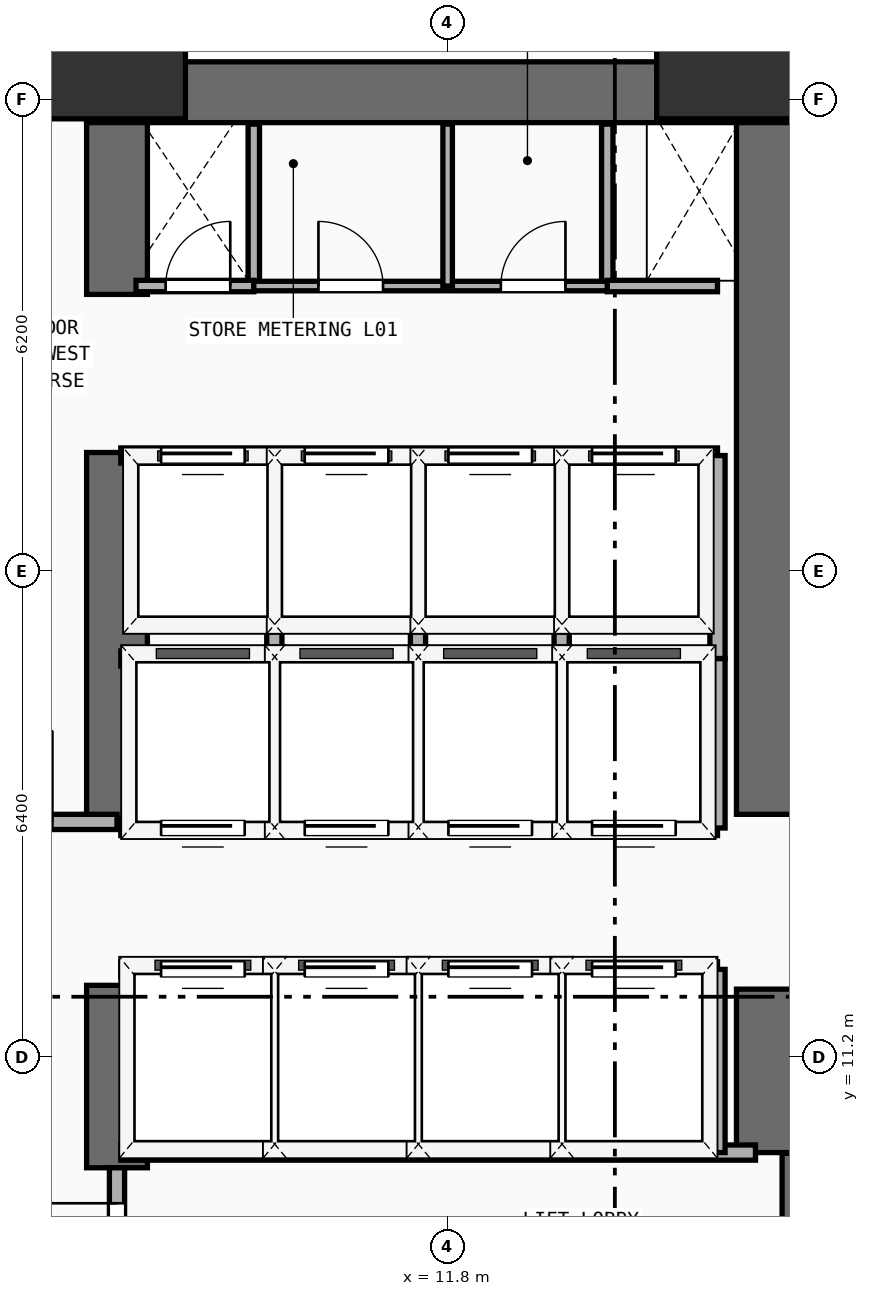
"""IFC4 building model, lengths in metres.
Left out: names, types, materials, properties, quantities, classifications, styles, units other than length and angle.
Written with IfcOpenShell. Run it as: python <this file> out.ifc"""

import sys

from ifc_helpers import new_model, si_unit, direction, frame, frame_2d, origin, origin_2d, place, context, subcontext, project, spatial, rectangle, extrude, element, fill, save


model = new_model("IFC4")
c1 = context("Model", 3, precision=1e-05, world=origin(), true_north=direction((0.0, 1.0)))
c2 = subcontext(c1, "Body", "Model", "MODEL_VIEW")
j1 = project(units=[si_unit("LENGTHUNIT", "METRE"), si_unit("PLANEANGLEUNIT", "RADIAN")], contexts=[c1])
p1 = place(None, origin())
s1 = spatial("IfcSite", under=j1, at=p1, CompositionType="ELEMENT")
p2 = place(p1, origin())
s2 = spatial("IfcBuilding", under=s1, at=p2, CompositionType="ELEMENT")
p3 = place(p2, origin())
s3 = spatial("IfcBuildingStorey", under=s2, at=p3, CompositionType="ELEMENT", Elevation=0.0)
p4 = place(p3, frame((7.05, 23.9, 0.0), z_axis=(0.0, 0.0, 1.0), x_axis=(1.0, 0.0, 0.0)))
e1 = element("IfcWall", 1, at=p4, inside=s3, PredefinedType="SHEAR", context=c2, shape_type="SweptSolid", body=[
    extrude(rectangle(XDim=14.15, YDim=0.8, at=frame_2d((7.075, 0.0))), origin(), (0.0, 0.0, 1.0), 5.26),
])
p5 = place(p3, frame((7.45, 9.75, 0.0), z_axis=(0.0, 0.0, 1.0), x_axis=(0.0, 1.0, 0.0)))
e2 = element("IfcWall", 2, at=p5, inside=s3, PredefinedType="SHEAR", context=c2, shape_type="SweptSolid", body=[
    extrude(rectangle(XDim=2.4, YDim=0.8, at=frame_2d((1.2, 0.0))), origin(), (0.0, 0.0, 1.0), 5.26),
])
p6 = place(p3, frame((7.45, 14.35, 0.0), z_axis=(0.0, 0.0, 1.0), x_axis=(0.0, 1.0, 0.0)))
e3 = element("IfcWall", 3, at=p6, inside=s3, PredefinedType="SHEAR", context=c2, shape_type="SweptSolid", body=[
    extrude(rectangle(XDim=4.81, YDim=0.8, at=frame_2d((2.405, 0.0))), origin(), (0.0, 0.0, 1.0), 5.26),
])
p7 = place(p3, frame((7.45, 21.24, 0.0), z_axis=(0.0, 0.0, 1.0), x_axis=(0.0, 1.0, 0.0)))
e4 = element("IfcWall", 4, at=p7, inside=s3, PredefinedType="SHEAR", context=c2, shape_type="SweptSolid", body=[
    extrude(rectangle(XDim=2.26, YDim=0.8, at=frame_2d((1.13, 0.0))), origin(), (0.0, 0.0, 1.0), 5.26),
])
p8 = place(p3, frame((16.0, 9.95, 0.0), z_axis=(0.0, 0.0, 1.0), x_axis=(0.0, 1.0, 0.0)))
e5 = element("IfcWall", 5, at=p8, inside=s3, PredefinedType="SHEAR", context=c2, shape_type="SweptSolid", body=[
    extrude(rectangle(XDim=2.15, YDim=0.8, at=frame_2d((1.075, 0.0))), origin(), (0.0, 0.0, 1.0), 5.26),
])
p9 = place(p3, frame((16.0, 14.4, 0.0), z_axis=(0.0, 0.0, 1.0), x_axis=(0.0, 1.0, 0.0)))
e6 = element("IfcWall", 6, at=p9, inside=s3, PredefinedType="SHEAR", context=c2, shape_type="SweptSolid", body=[
    extrude(rectangle(XDim=9.1, YDim=0.8, at=frame_2d((4.55, 0.0))), origin(), (0.0, 0.0, 1.0), 5.26),
])
for number, where, z_axis, x_axis in (
    (7, (7.45, 24.45, 0.0), (0.0, 0.0, 1.0), (1.0, 0.0, 0.0)),
    (8, (15.45, 24.45, 0.0), (0.0, 0.0, 1.0), (1.0, 0.0, 0.0)),
):
    element("IfcColumn", number, at=place(p3, frame(where, z_axis=z_axis, x_axis=x_axis)), inside=s3, PredefinedType="COLUMN", context=c2, shape_type="SweptSolid", body=[
        extrude(rectangle(XDim=1.8, YDim=1.8, at=origin_2d()), origin(), (0.0, 0.0, 1.0), 5.26),
    ])
p10 = place(p3, frame((16.3, 7.36, 0.0), z_axis=(0.0, 0.0, 1.0), x_axis=(0.0, 1.0, 0.0)))
e9 = element("IfcWall", 9, at=p10, inside=s3, PredefinedType="SHEAR", context=c2, shape_type="SweptSolid", body=[
    extrude(rectangle(XDim=2.58, YDim=0.2, at=frame_2d((1.29, 0.0))), origin(), (0.0, 0.0, 1.0), 5.26),
])
p11 = place(p3, frame((7.5, 9.95, 0.0), z_axis=(0.0, 0.0, 1.0), x_axis=(1.0, 0.0, 0.0)))
e10 = element("IfcWall", 10, at=p11, inside=s3, PredefinedType="PARTITIONING", context=c2, shape_type="SweptSolid", body=[
    extrude(rectangle(XDim=8.35, YDim=0.2, at=frame_2d((4.175, 0.0))), origin(), (0.0, 0.0, 1.0), 5.26),
])
p12 = place(p3, frame((7.45, 7.45, 0.0), z_axis=(0.0, 0.0, 1.0), x_axis=(0.0, 1.0, 0.0)))
e11 = element("IfcWall", 11, at=p12, inside=s3, PredefinedType="PARTITIONING", context=c2, shape_type="SweptSolid", body=[
    extrude(rectangle(XDim=2.3, YDim=0.2, at=frame_2d((1.15, 0.0))), origin(), (0.0, 0.0, 1.0), 4.04),
])
p13 = place(p12, frame((0.633, 0.0, 0.0)))
e12 = element("IfcOpeningElement", 12, at=p13, cuts=e11, PredefinedType="OPENING", context=c2, shape_type="SweptSolid", body=[
    extrude(rectangle(XDim=1.2, YDim=2.25, at=frame_2d((0.6, 1.125))), frame((0.0, 0.11, 0.0), z_axis=(0.0, -1.0, 0.0), x_axis=(1.0, 0.0, 0.0)), (0.0, 0.0, 1.0), 0.22),
])
p14 = place(p3, frame((7.5, 12.36, 0.0), z_axis=(0.0, 0.0, 1.0), x_axis=(1.0, 0.0, 0.0)))
e13 = element("IfcWall", 13, at=p14, inside=s3, PredefinedType="PARTITIONING", context=c2, shape_type="SweptSolid", body=[
    extrude(rectangle(XDim=7.85, YDim=0.2, at=frame_2d((3.925, 0.0))), origin(), (0.0, 0.0, 1.0), 5.26),
])
p15 = place(p14, frame((0.53, 0.0, 0.0)))
e14 = element("IfcOpeningElement", 14, at=p15, cuts=e13, PredefinedType="OPENING", context=c2, shape_type="SweptSolid", body=[
    extrude(rectangle(XDim=1.1, YDim=2.2, at=frame_2d((0.55, 1.1))), frame((0.0, 0.11, 0.0), z_axis=(0.0, -1.0, 0.0), x_axis=(1.0, 0.0, 0.0)), (0.0, 0.0, 1.0), 0.22),
])
p16 = place(p14, frame((2.42, 0.0, 0.0)))
e15 = element("IfcOpeningElement", 15, at=p16, cuts=e13, PredefinedType="OPENING", context=c2, shape_type="SweptSolid", body=[
    extrude(rectangle(XDim=1.1, YDim=2.2, at=frame_2d((0.55, 1.1))), frame((0.0, 0.11, 0.0), z_axis=(0.0, -1.0, 0.0), x_axis=(1.0, 0.0, 0.0)), (0.0, 0.0, 1.0), 0.22),
])
p17 = place(p14, frame((4.31, 0.0, 0.0)))
e16 = element("IfcOpeningElement", 16, at=p17, cuts=e13, PredefinedType="OPENING", context=c2, shape_type="SweptSolid", body=[
    extrude(rectangle(XDim=1.1, YDim=2.2, at=frame_2d((0.55, 1.1))), frame((0.0, 0.11, 0.0), z_axis=(0.0, -1.0, 0.0), x_axis=(1.0, 0.0, 0.0)), (0.0, 0.0, 1.0), 0.22),
])
p18 = place(p14, frame((6.2, 0.0, 0.0)))
e17 = element("IfcOpeningElement", 17, at=p18, cuts=e13, PredefinedType="OPENING", context=c2, shape_type="SweptSolid", body=[
    extrude(rectangle(XDim=1.1, YDim=2.2, at=frame_2d((0.55, 1.1))), frame((0.0, 0.11, 0.0), z_axis=(0.0, -1.0, 0.0), x_axis=(1.0, 0.0, 0.0)), (0.0, 0.0, 1.0), 0.22),
])
for number, where, z_axis, x_axis in (
    (18, (15.35, 9.95, 0.0), (0.0, 0.0, 1.0), (0.0, 1.0, 0.0)),
    (19, (9.52, 9.95, 0.0), (0.0, 0.0, 1.0), (0.0, 1.0, 0.0)),
    (20, (11.41, 9.95, 0.0), (0.0, 0.0, 1.0), (0.0, 1.0, 0.0)),
    (21, (13.3, 9.95, 0.0), (0.0, 0.0, 1.0), (0.0, 1.0, 0.0)),
):
    element("IfcWall", number, at=place(p3, frame(where, z_axis=z_axis, x_axis=x_axis)), inside=s3, PredefinedType="PARTITIONING", context=c2, shape_type="SweptSolid", body=[
        extrude(rectangle(XDim=2.41, YDim=0.2, at=frame_2d((1.205, 0.0))), origin(), (0.0, 0.0, 1.0), 5.26),
    ])
p19 = place(p3, frame((7.5, 14.22, 0.0), z_axis=(0.0, 0.0, 1.0), x_axis=(1.0, 0.0, 0.0)))
e22 = element("IfcWall", 22, at=p19, inside=s3, PredefinedType="PARTITIONING", context=c2, shape_type="SweptSolid", body=[
    extrude(rectangle(XDim=7.85, YDim=0.2, at=frame_2d((3.925, 0.0))), origin(), (0.0, 0.0, 1.0), 5.26),
])
p20 = place(p19, frame((0.53, 0.0, 0.0)))
e23 = element("IfcOpeningElement", 23, at=p20, cuts=e22, PredefinedType="OPENING", context=c2, shape_type="SweptSolid", body=[
    extrude(rectangle(XDim=1.1, YDim=2.2, at=frame_2d((0.55, 1.1))), frame((0.0, 0.11, 0.0), z_axis=(0.0, -1.0, 0.0), x_axis=(1.0, 0.0, 0.0)), (0.0, 0.0, 1.0), 0.22),
])
p21 = place(p19, frame((2.42, 0.0, 0.0)))
e24 = element("IfcOpeningElement", 24, at=p21, cuts=e22, PredefinedType="OPENING", context=c2, shape_type="SweptSolid", body=[
    extrude(rectangle(XDim=1.1, YDim=2.2, at=frame_2d((0.55, 1.1))), frame((0.0, 0.11, 0.0), z_axis=(0.0, -1.0, 0.0), x_axis=(1.0, 0.0, 0.0)), (0.0, 0.0, 1.0), 0.22),
])
p22 = place(p19, frame((4.31, 0.0, 0.0)))
e25 = element("IfcOpeningElement", 25, at=p22, cuts=e22, PredefinedType="OPENING", context=c2, shape_type="SweptSolid", body=[
    extrude(rectangle(XDim=1.1, YDim=2.2, at=frame_2d((0.55, 1.1))), frame((0.0, 0.11, 0.0), z_axis=(0.0, -1.0, 0.0), x_axis=(1.0, 0.0, 0.0)), (0.0, 0.0, 1.0), 0.22),
])
p23 = place(p19, frame((6.2, 0.0, 0.0)))
e26 = element("IfcOpeningElement", 26, at=p23, cuts=e22, PredefinedType="OPENING", context=c2, shape_type="SweptSolid", body=[
    extrude(rectangle(XDim=1.1, YDim=2.2, at=frame_2d((0.55, 1.1))), frame((0.0, 0.11, 0.0), z_axis=(0.0, -1.0, 0.0), x_axis=(1.0, 0.0, 0.0)), (0.0, 0.0, 1.0), 0.22),
])
p24 = place(p3, frame((7.5, 16.45, 0.0), z_axis=(0.0, 0.0, 1.0), x_axis=(1.0, 0.0, 0.0)))
e27 = element("IfcWall", 27, at=p24, inside=s3, PredefinedType="PARTITIONING", context=c2, shape_type="SweptSolid", body=[
    extrude(rectangle(XDim=7.85, YDim=0.2, at=frame_2d((3.925, 0.0))), origin(), (0.0, 0.0, 1.0), 5.26),
])
for number, where, z_axis, x_axis in (
    (28, (15.35, 14.22, 0.0), (0.0, 0.0, 1.0), (0.0, 1.0, 0.0)),
    (29, (9.52, 14.22, 0.0), (0.0, 0.0, 1.0), (0.0, 1.0, 0.0)),
    (30, (11.41, 14.22, 0.0), (0.0, 0.0, 1.0), (0.0, 1.0, 0.0)),
    (31, (13.3, 14.22, 0.0), (0.0, 0.0, 1.0), (0.0, 1.0, 0.0)),
):
    element("IfcWall", number, at=place(p3, frame(where, z_axis=z_axis, x_axis=x_axis)), inside=s3, PredefinedType="PARTITIONING", context=c2, shape_type="SweptSolid", body=[
        extrude(rectangle(XDim=2.23, YDim=0.2, at=frame_2d((1.115, 0.0))), origin(), (0.0, 0.0, 1.0), 5.26),
    ])
p25 = place(p3, frame((7.5, 19.12, 0.0), z_axis=(0.0, 0.0, 1.0), x_axis=(1.0, 0.0, 0.0)))
e32 = element("IfcWall", 32, at=p25, inside=s3, PredefinedType="PARTITIONING", context=c2, shape_type="SweptSolid", body=[
    extrude(rectangle(XDim=7.85, YDim=0.2, at=frame_2d((3.925, 0.0))), origin(), (0.0, 0.0, 1.0), 5.26),
])
p26 = place(p25, frame((0.53, 0.0, 0.0)))
e33 = element("IfcOpeningElement", 33, at=p26, cuts=e32, PredefinedType="OPENING", context=c2, shape_type="SweptSolid", body=[
    extrude(rectangle(XDim=1.1, YDim=2.2, at=frame_2d((0.55, 1.1))), frame((0.0, 0.11, 0.0), z_axis=(0.0, -1.0, 0.0), x_axis=(1.0, 0.0, 0.0)), (0.0, 0.0, 1.0), 0.22),
])
p27 = place(p25, frame((2.42, 0.0, 0.0)))
e34 = element("IfcOpeningElement", 34, at=p27, cuts=e32, PredefinedType="OPENING", context=c2, shape_type="SweptSolid", body=[
    extrude(rectangle(XDim=1.1, YDim=2.2, at=frame_2d((0.55, 1.1))), frame((0.0, 0.11, 0.0), z_axis=(0.0, -1.0, 0.0), x_axis=(1.0, 0.0, 0.0)), (0.0, 0.0, 1.0), 0.22),
])
p28 = place(p25, frame((4.31, 0.0, 0.0)))
e35 = element("IfcOpeningElement", 35, at=p28, cuts=e32, PredefinedType="OPENING", context=c2, shape_type="SweptSolid", body=[
    extrude(rectangle(XDim=1.1, YDim=2.2, at=frame_2d((0.55, 1.1))), frame((0.0, 0.11, 0.0), z_axis=(0.0, -1.0, 0.0), x_axis=(1.0, 0.0, 0.0)), (0.0, 0.0, 1.0), 0.22),
])
p29 = place(p25, frame((6.2, 0.0, 0.0)))
e36 = element("IfcOpeningElement", 36, at=p29, cuts=e32, PredefinedType="OPENING", context=c2, shape_type="SweptSolid", body=[
    extrude(rectangle(XDim=1.1, YDim=2.2, at=frame_2d((0.55, 1.1))), frame((0.0, 0.11, 0.0), z_axis=(0.0, -1.0, 0.0), x_axis=(1.0, 0.0, 0.0)), (0.0, 0.0, 1.0), 0.22),
])
for number, where, z_axis, x_axis in (
    (37, (15.35, 16.45, 0.0), (0.0, 0.0, 1.0), (0.0, 1.0, 0.0)),
    (38, (9.52, 16.45, 0.0), (0.0, 0.0, 1.0), (0.0, 1.0, 0.0)),
    (39, (11.41, 16.45, 0.0), (0.0, 0.0, 1.0), (0.0, 1.0, 0.0)),
    (40, (13.3, 16.45, 0.0), (0.0, 0.0, 1.0), (0.0, 1.0, 0.0)),
):
    element("IfcWall", number, at=place(p3, frame(where, z_axis=z_axis, x_axis=x_axis)), inside=s3, PredefinedType="PARTITIONING", context=c2, shape_type="SweptSolid", body=[
        extrude(rectangle(XDim=2.67, YDim=0.2, at=frame_2d((1.335, 0.0))), origin(), (0.0, 0.0, 1.0), 5.26),
    ])
for number, where, z_axis, x_axis in (
    (41, (9.25, 21.35, 0.0), (0.0, 0.0, 1.0), (0.0, 1.0, 0.0)),
    (42, (13.9, 21.35, 0.0), (0.0, 0.0, 1.0), (0.0, 1.0, 0.0)),
):
    element("IfcWall", number, at=place(p3, frame(where, z_axis=z_axis, x_axis=x_axis)), inside=s3, PredefinedType="PARTITIONING", context=c2, shape_type="SweptSolid", body=[
        extrude(rectangle(XDim=2.13, YDim=0.15, at=frame_2d((1.065, 0.0))), origin(), (0.0, 0.0, 1.0), 5.26),
    ])
p30 = place(p3, frame((7.7, 21.35, 0.0), z_axis=(0.0, 0.0, 1.0), x_axis=(1.0, 0.0, 0.0)))
e43 = element("IfcWall", 43, at=p30, inside=s3, PredefinedType="PARTITIONING", context=c2, shape_type="SweptSolid", body=[
    extrude(rectangle(XDim=1.55, YDim=0.15, at=frame_2d((0.775, 0.0))), origin(), (0.0, 0.0, 1.0), 5.26),
])
p31 = place(p30, frame((0.39, 0.0, 0.0)))
e44 = element("IfcOpeningElement", 44, at=p31, cuts=e43, PredefinedType="OPENING", context=c2, shape_type="SweptSolid", body=[
    extrude(rectangle(XDim=0.85, YDim=2.15, at=frame_2d((0.425, 1.075))), frame((0.0, 0.085, 0.0), z_axis=(0.0, -1.0, 0.0), x_axis=(1.0, 0.0, 0.0)), (0.0, 0.0, 1.0), 0.17),
])
p32 = place(p3, frame((13.9, 21.35, 0.0), z_axis=(0.0, 0.0, 1.0), x_axis=(1.0, 0.0, 0.0)))
e45 = element("IfcWall", 45, at=p32, inside=s3, PredefinedType="PARTITIONING", context=c2, shape_type="SweptSolid", body=[
    extrude(rectangle(XDim=1.45, YDim=0.15, at=frame_2d((0.725, 0.0))), origin(), (0.0, 0.0, 1.0), 5.26),
])
p33 = place(p3, frame((9.25, 21.35, 0.0), z_axis=(0.0, 0.0, 1.0), x_axis=(1.0, 0.0, 0.0)))
e46 = element("IfcWall", 46, at=p33, inside=s3, PredefinedType="PARTITIONING", context=c2, shape_type="SweptSolid", body=[
    extrude(rectangle(XDim=4.65, YDim=0.125, at=frame_2d((2.325, 0.0))), origin(), (0.0, 0.0, 1.0), 5.26),
])
p34 = place(p33, frame((0.85, 0.0, 0.0)))
e47 = element("IfcOpeningElement", 47, at=p34, cuts=e46, PredefinedType="OPENING", context=c2, shape_type="SweptSolid", body=[
    extrude(rectangle(XDim=0.85, YDim=2.15, at=frame_2d((0.425, 1.075))), frame((0.0, 0.073, 0.0), z_axis=(0.0, -1.0, 0.0), x_axis=(1.0, 0.0, 0.0)), (0.0, 0.0, 1.0), 0.145),
])
p35 = place(p33, frame((3.25, 0.0, 0.0)))
e48 = element("IfcOpeningElement", 48, at=p35, cuts=e46, PredefinedType="OPENING", context=c2, shape_type="SweptSolid", body=[
    extrude(rectangle(XDim=0.85, YDim=2.15, at=frame_2d((0.425, 1.075))), frame((0.0, 0.073, 0.0), z_axis=(0.0, -1.0, 0.0), x_axis=(1.0, 0.0, 0.0)), (0.0, 0.0, 1.0), 0.145),
])
p36 = place(p3, frame((11.8, 21.35, 0.0), z_axis=(0.0, 0.0, 1.0), x_axis=(0.0, 1.0, 0.0)))
e49 = element("IfcWall", 49, at=p36, inside=s3, PredefinedType="PARTITIONING", context=c2, shape_type="SweptSolid", body=[
    extrude(rectangle(XDim=2.13, YDim=0.125, at=frame_2d((1.065, 0.0))), origin(), (0.0, 0.0, 1.0), 5.26),
])
p37 = place(p3, frame((0.42, 14.3, 0.0), z_axis=(0.0, 0.0, 1.0), x_axis=(1.0, 0.0, 0.0)))
e50 = element("IfcWall", 50, at=p37, inside=s3, PredefinedType="PARTITIONING", context=c2, shape_type="SweptSolid", body=[
    extrude(rectangle(XDim=7.03, YDim=0.2, at=frame_2d((3.515, 0.0))), origin(), (0.0, 0.0, 1.0), 5.26),
])
p38 = place(p37, frame((4.98, 0.0, 0.0)))
e51 = element("IfcOpeningElement", 51, at=p38, cuts=e50, PredefinedType="OPENING", context=c2, shape_type="SweptSolid", body=[
    extrude(rectangle(XDim=1.2, YDim=2.25, at=frame_2d((0.6, 1.125))), frame((0.0, 0.11, 0.0), z_axis=(0.0, -1.0, 0.0), x_axis=(1.0, 0.0, 0.0)), (0.0, 0.0, 1.0), 0.22),
])
p39 = place(p13, frame((1.2, 0.0, 0.0), z_axis=(0.0, 0.0, 1.0), x_axis=(-1.0, 0.0, 0.0)))
e52 = element("IfcDoor", 52, at=p39, inside=s3, OperationType="SINGLE_SWING_LEFT", PredefinedType="DOOR", context=c2, shape_type="SweptSolid", body=[
    extrude(rectangle(XDim=1.2, YDim=2.25, at=frame_2d((0.6, 1.125))), frame((0.0, 0.025, 0.0), z_axis=(0.0, -1.0, 0.0), x_axis=(1.0, 0.0, 0.0)), (0.0, 0.0, 1.0), 0.05),
])
fill(e12, e52)
p40 = place(p15, origin())
e53 = element("IfcDoor", 53, at=p40, inside=s3, OperationType="SLIDING_TO_LEFT", PredefinedType="DOOR", context=c2, shape_type="SweptSolid", body=[
    extrude(rectangle(XDim=1.1, YDim=2.2, at=frame_2d((0.55, 1.1))), frame((0.0, 0.025, 0.0), z_axis=(0.0, -1.0, 0.0), x_axis=(1.0, 0.0, 0.0)), (0.0, 0.0, 1.0), 0.05),
])
fill(e14, e53)
p41 = place(p16, origin())
e54 = element("IfcDoor", 54, at=p41, inside=s3, OperationType="SLIDING_TO_LEFT", PredefinedType="DOOR", context=c2, shape_type="SweptSolid", body=[
    extrude(rectangle(XDim=1.1, YDim=2.2, at=frame_2d((0.55, 1.1))), frame((0.0, 0.025, 0.0), z_axis=(0.0, -1.0, 0.0), x_axis=(1.0, 0.0, 0.0)), (0.0, 0.0, 1.0), 0.05),
])
fill(e15, e54)
p42 = place(p17, origin())
e55 = element("IfcDoor", 55, at=p42, inside=s3, OperationType="SLIDING_TO_LEFT", PredefinedType="DOOR", context=c2, shape_type="SweptSolid", body=[
    extrude(rectangle(XDim=1.1, YDim=2.2, at=frame_2d((0.55, 1.1))), frame((0.0, 0.025, 0.0), z_axis=(0.0, -1.0, 0.0), x_axis=(1.0, 0.0, 0.0)), (0.0, 0.0, 1.0), 0.05),
])
fill(e16, e55)
p43 = place(p18, origin())
e56 = element("IfcDoor", 56, at=p43, inside=s3, OperationType="SLIDING_TO_LEFT", PredefinedType="DOOR", context=c2, shape_type="SweptSolid", body=[
    extrude(rectangle(XDim=1.1, YDim=2.2, at=frame_2d((0.55, 1.1))), frame((0.0, 0.025, 0.0), z_axis=(0.0, -1.0, 0.0), x_axis=(1.0, 0.0, 0.0)), (0.0, 0.0, 1.0), 0.05),
])
fill(e17, e56)
p44 = place(p20, frame((1.1, 0.0, 0.0), z_axis=(0.0, 0.0, 1.0), x_axis=(-1.0, 0.0, 0.0)))
e57 = element("IfcDoor", 57, at=p44, inside=s3, OperationType="SLIDING_TO_LEFT", PredefinedType="DOOR", context=c2, shape_type="SweptSolid", body=[
    extrude(rectangle(XDim=1.1, YDim=2.2, at=frame_2d((0.55, 1.1))), frame((0.0, 0.025, 0.0), z_axis=(0.0, -1.0, 0.0), x_axis=(1.0, 0.0, 0.0)), (0.0, 0.0, 1.0), 0.05),
])
fill(e23, e57)
p45 = place(p21, frame((1.1, 0.0, 0.0), z_axis=(0.0, 0.0, 1.0), x_axis=(-1.0, 0.0, 0.0)))
e58 = element("IfcDoor", 58, at=p45, inside=s3, OperationType="SLIDING_TO_LEFT", PredefinedType="DOOR", context=c2, shape_type="SweptSolid", body=[
    extrude(rectangle(XDim=1.1, YDim=2.2, at=frame_2d((0.55, 1.1))), frame((0.0, 0.025, 0.0), z_axis=(0.0, -1.0, 0.0), x_axis=(1.0, 0.0, 0.0)), (0.0, 0.0, 1.0), 0.05),
])
fill(e24, e58)
p46 = place(p22, frame((1.1, 0.0, 0.0), z_axis=(0.0, 0.0, 1.0), x_axis=(-1.0, 0.0, 0.0)))
e59 = element("IfcDoor", 59, at=p46, inside=s3, OperationType="SLIDING_TO_LEFT", PredefinedType="DOOR", context=c2, shape_type="SweptSolid", body=[
    extrude(rectangle(XDim=1.1, YDim=2.2, at=frame_2d((0.55, 1.1))), frame((0.0, 0.025, 0.0), z_axis=(0.0, -1.0, 0.0), x_axis=(1.0, 0.0, 0.0)), (0.0, 0.0, 1.0), 0.05),
])
fill(e25, e59)
p47 = place(p23, frame((1.1, 0.0, 0.0), z_axis=(0.0, 0.0, 1.0), x_axis=(-1.0, 0.0, 0.0)))
e60 = element("IfcDoor", 60, at=p47, inside=s3, OperationType="SLIDING_TO_LEFT", PredefinedType="DOOR", context=c2, shape_type="SweptSolid", body=[
    extrude(rectangle(XDim=1.1, YDim=2.2, at=frame_2d((0.55, 1.1))), frame((0.0, 0.025, 0.0), z_axis=(0.0, -1.0, 0.0), x_axis=(1.0, 0.0, 0.0)), (0.0, 0.0, 1.0), 0.05),
])
fill(e26, e60)
p48 = place(p26, origin())
e61 = element("IfcDoor", 61, at=p48, inside=s3, OperationType="SLIDING_TO_LEFT", PredefinedType="DOOR", context=c2, shape_type="SweptSolid", body=[
    extrude(rectangle(XDim=1.1, YDim=2.2, at=frame_2d((0.55, 1.1))), frame((0.0, 0.025, 0.0), z_axis=(0.0, -1.0, 0.0), x_axis=(1.0, 0.0, 0.0)), (0.0, 0.0, 1.0), 0.05),
])
fill(e33, e61)
p49 = place(p27, origin())
e62 = element("IfcDoor", 62, at=p49, inside=s3, OperationType="SLIDING_TO_LEFT", PredefinedType="DOOR", context=c2, shape_type="SweptSolid", body=[
    extrude(rectangle(XDim=1.1, YDim=2.2, at=frame_2d((0.55, 1.1))), frame((0.0, 0.025, 0.0), z_axis=(0.0, -1.0, 0.0), x_axis=(1.0, 0.0, 0.0)), (0.0, 0.0, 1.0), 0.05),
])
fill(e34, e62)
p50 = place(p28, origin())
e63 = element("IfcDoor", 63, at=p50, inside=s3, OperationType="SLIDING_TO_LEFT", PredefinedType="DOOR", context=c2, shape_type="SweptSolid", body=[
    extrude(rectangle(XDim=1.1, YDim=2.2, at=frame_2d((0.55, 1.1))), frame((0.0, 0.025, 0.0), z_axis=(0.0, -1.0, 0.0), x_axis=(1.0, 0.0, 0.0)), (0.0, 0.0, 1.0), 0.05),
])
fill(e35, e63)
p51 = place(p29, origin())
e64 = element("IfcDoor", 64, at=p51, inside=s3, OperationType="SLIDING_TO_LEFT", PredefinedType="DOOR", context=c2, shape_type="SweptSolid", body=[
    extrude(rectangle(XDim=1.1, YDim=2.2, at=frame_2d((0.55, 1.1))), frame((0.0, 0.025, 0.0), z_axis=(0.0, -1.0, 0.0), x_axis=(1.0, 0.0, 0.0)), (0.0, 0.0, 1.0), 0.05),
])
fill(e36, e64)
p52 = place(p31, origin())
e65 = element("IfcDoor", 65, at=p52, inside=s3, OperationType="SINGLE_SWING_RIGHT", PredefinedType="DOOR", context=c2, shape_type="SweptSolid", body=[
    extrude(rectangle(XDim=0.85, YDim=2.15, at=frame_2d((0.425, 1.075))), frame((0.0, 0.025, 0.0), z_axis=(0.0, -1.0, 0.0), x_axis=(1.0, 0.0, 0.0)), (0.0, 0.0, 1.0), 0.05),
])
fill(e44, e65)
p53 = place(p34, origin())
e66 = element("IfcDoor", 66, at=p53, inside=s3, OperationType="SINGLE_SWING_LEFT", PredefinedType="DOOR", context=c2, shape_type="SweptSolid", body=[
    extrude(rectangle(XDim=0.85, YDim=2.15, at=frame_2d((0.425, 1.075))), frame((0.0, 0.025, 0.0), z_axis=(0.0, -1.0, 0.0), x_axis=(1.0, 0.0, 0.0)), (0.0, 0.0, 1.0), 0.05),
])
fill(e47, e66)
p54 = place(p35, origin())
e67 = element("IfcDoor", 67, at=p54, inside=s3, OperationType="SINGLE_SWING_RIGHT", PredefinedType="DOOR", context=c2, shape_type="SweptSolid", body=[
    extrude(rectangle(XDim=0.85, YDim=2.15, at=frame_2d((0.425, 1.075))), frame((0.0, 0.025, 0.0), z_axis=(0.0, -1.0, 0.0), x_axis=(1.0, 0.0, 0.0)), (0.0, 0.0, 1.0), 0.05),
])
fill(e48, e67)
save(model, sys.argv[1])
